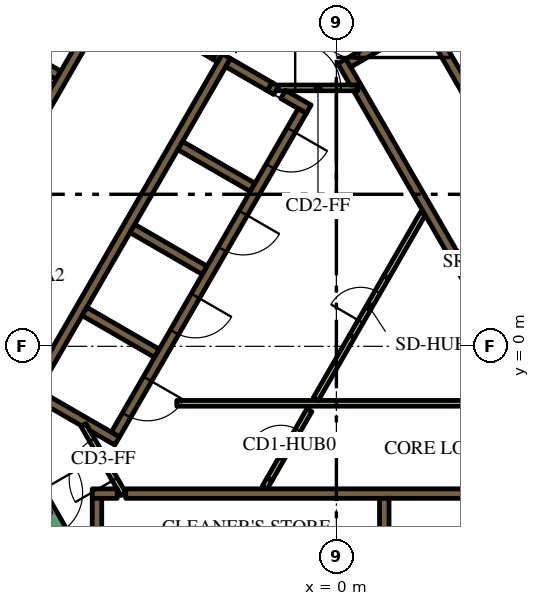
"""IFC4 building model, lengths in metres.
Left out: names, types, materials, properties, quantities, classifications, styles, units other than length and angle.
Written with IfcOpenShell. Run it as: python <this file> out.ifc"""

import sys

from ifc_helpers import new_model, si_unit, direction, frame, frame_2d, origin, place, context, subcontext, project, spatial, polyline, rectangle, outline, extrude, element, fill, save


model = new_model("IFC4")
c1 = context("Model", 3, precision=1e-05, world=origin(), true_north=direction((0.0, 1.0)))
c2 = subcontext(c1, "Body", "Model", "MODEL_VIEW")
j1 = project(units=[si_unit("LENGTHUNIT", "METRE"), si_unit("PLANEANGLEUNIT", "RADIAN")], contexts=[c1])
p1 = place(None, origin())
s1 = spatial("IfcSite", under=j1, at=p1, CompositionType="ELEMENT")
p2 = place(p1, origin())
s2 = spatial("IfcBuilding", under=s1, at=p2, CompositionType="ELEMENT")
p3 = place(p2, frame((0.0, 0.0, 27.6)))
s3 = spatial("IfcBuildingStorey", under=s2, at=p3, CompositionType="ELEMENT", Elevation=27.6)
p4 = place(p3, frame((-15.36, -1.503, 0.0), z_axis=(0.0, 0.0, 1.0), x_axis=(0.50000389221, 0.866023156604, 0.0)))
e1 = element("IfcWall", 1, at=p4, inside=s3, PredefinedType="SOLIDWALL", context=c2, shape_type="SweptSolid", body=[
    extrude(rectangle(XDim=21.0, YDim=0.9, at=frame_2d((10.5, 0.0))), origin(), (0.0, 0.0, 1.0), 3.9),
])
p5 = place(p3, frame((-5.545, -3.875, 0.0), z_axis=(0.0, 0.0, 1.0), x_axis=(1.0, 0.0, 0.0)))
e2 = element("IfcWall", 2, at=p5, inside=s3, PredefinedType="SOLIDWALL", context=c2, shape_type="SweptSolid", body=[
    extrude(rectangle(XDim=11.97, YDim=0.25, at=frame_2d((5.985, 0.0))), origin(), (0.0, 0.0, 1.0), 3.9),
])
p6 = place(p3, frame((-6.425, -3.875, 0.0), z_axis=(0.0, 0.0, 1.0), x_axis=(1.0, 0.0, 0.0)))
e3 = element("IfcWall", 3, at=p6, inside=s3, PredefinedType="SOLIDWALL", context=c2, shape_type="SweptSolid", body=[
    extrude(rectangle(XDim=0.658, YDim=0.25, at=frame_2d((0.329, 0.0))), origin(), (0.0, 0.0, 1.0), 3.9),
])
p7 = place(p3, frame((1.26, -4.0, 0.0), z_axis=(0.0, 0.0, 1.0), x_axis=(0.0, -1.0, 0.0)))
e4 = element("IfcWall", 4, at=p7, inside=s3, PredefinedType="SOLIDWALL", context=c2, shape_type="SweptSolid", body=[
    extrude(rectangle(XDim=2.2, YDim=0.25, at=frame_2d((1.1, 0.0))), origin(), (0.0, 0.0, 1.0), 3.9),
])
p8 = place(p3, frame((-6.3, -4.0, 0.0), z_axis=(0.0, 0.0, 1.0), x_axis=(0.0, -1.0, 0.0)))
e5 = element("IfcWall", 5, at=p8, inside=s3, PredefinedType="SOLIDWALL", context=c2, shape_type="SweptSolid", body=[
    extrude(rectangle(XDim=3.154, YDim=0.25, at=frame_2d((1.577, 0.0))), origin(), (0.0, 0.0, 1.0), 3.9),
])
p9 = place(p3, origin())
e6 = element("IfcWall", 6, at=p9, inside=s3, PredefinedType="SOLIDWALL", context=c2, shape_type="SweptSolid", body=[
    extrude(outline(polyline([(0.566, 6.725), (0.566, 6.875), (0.566, 6.875), (0.565, 6.875), (0.361, 6.875), (0.035, 7.439), (0.252, 7.564), (0.377, 7.348), (6.552, -3.348), (6.677, -3.564), (6.46, -3.689), (0.448, 6.725), (0.565, 6.725), (0.566, 6.725), (0.566, 6.725)])), origin(), (0.0, 0.0, 1.0), 3.9),
])
p10 = place(p3, frame((0.314, 7.456, 0.0), z_axis=(0.0, 0.0, 1.0), x_axis=(0.866013897511, 0.50001992892, 0.0)))
e7 = element("IfcWall", 7, at=p10, inside=s3, PredefinedType="SOLIDWALL", context=c2, shape_type="SweptSolid", body=[
    extrude(rectangle(XDim=3.268, YDim=0.25, at=frame_2d((1.634, 0.0))), origin(), (0.0, 0.0, 1.0), 3.9),
])
p11 = place(p3, frame((-8.06, -1.311, 0.0), z_axis=(0.0, 0.0, 1.0), x_axis=(0.50000273126, 0.866023826885, 0.0)))
e8 = element("IfcWall", 8, at=p11, inside=s3, PredefinedType="SOLIDWALL", context=c2, shape_type="SweptSolid", body=[
    extrude(rectangle(XDim=10.33, YDim=0.25, at=frame_2d((5.165, 0.0))), origin(), (0.0, 0.0, 1.0), 3.9),
])
p12 = place(p3, frame((-1.758, 6.835, 0.0), z_axis=(0.0, 0.0, 1.0), x_axis=(0.865982457891, -0.500074377092, 0.0)))
e9 = element("IfcWall", 9, at=p12, inside=s3, PredefinedType="SOLIDWALL", context=c2, shape_type="SweptSolid", body=[
    extrude(rectangle(XDim=0.2, YDim=0.25, at=frame_2d((0.1, 0.0))), origin(), (0.0, 0.0, 1.0), 3.9),
])
p13 = place(p3, frame((-1.76, 6.836, 0.0), z_axis=(0.0, 0.0, 1.0), x_axis=(-0.865952863304, 0.500125622755, 0.0)))
e10 = element("IfcWall", 10, at=p13, inside=s3, PredefinedType="SOLIDWALL", context=c2, shape_type="SweptSolid", body=[
    extrude(rectangle(XDim=1.258, YDim=0.25, at=frame_2d((0.629, 0.0))), origin(), (0.0, 0.0, 1.0), 3.9),
])
p14 = place(p3, frame((-0.728, 6.24, 0.0), z_axis=(0.0, 0.0, 1.0), x_axis=(-0.865955664968, 0.500120771724, 0.0)))
e11 = element("IfcWall", 11, at=p14, inside=s3, PredefinedType="SOLIDWALL", context=c2, shape_type="SweptSolid", body=[
    extrude(rectangle(XDim=0.778, YDim=0.25, at=frame_2d((0.389, 0.0))), origin(), (0.0, 0.0, 1.0), 3.9),
])
for number, where, z_axis, x_axis in (
    (12, (-2.204, 4.182, 0.0), (0.0, 0.0, 1.0), (-0.866, 0.5, 0.0)),
    (13, (-5.369, 3.1, 0.0), (0.0, 0.0, 1.0), (0.866, -0.5, 0.0)),
    (14, (-4.724, -0.182, 0.0), (0.0, 0.0, 1.0), (-0.866, 0.5, 0.0)),
):
    element("IfcWall", number, at=place(p3, frame(where, z_axis=z_axis, x_axis=x_axis)), inside=s3, PredefinedType="SOLIDWALL", context=c2, shape_type="SweptSolid", body=[
        extrude(rectangle(XDim=2.2, YDim=0.25, at=frame_2d((1.1, 0.0))), origin(), (0.0, 0.0, 1.0), 3.9),
    ])
e15 = element("IfcWall", 15, at=p9, inside=s3, PredefinedType="SOLIDWALL", context=c2, shape_type="SweptSolid", body=[
    extrude(outline(polyline([(-5.922, -2.257), (-5.922, -2.257), (-5.705, -2.382), (-5.83, -2.598), (-6.483, -2.221), (-6.591, -2.033), (-6.591, -2.033), (-6.7, -2.096), (-7.952, -1.373), (-7.827, -1.156), (-5.922, -2.257)])), origin(), (0.0, 0.0, 1.0), 3.9),
])
e16 = element("IfcWall", 16, at=p9, inside=s3, PredefinedType="SOLIDWALL", context=c2, shape_type="SweptSolid", body=[
    extrude(outline(polyline([(-3.128, 7.481), (-3.259, 7.557), (-3.134, 7.773), (-3.003, 7.698), (-3.128, 7.481)])), origin(), (0.0, 0.0, 1.0), 3.9),
])
p15 = place(p3, frame((-7.314, 7.132, 0.0), z_axis=(0.0, 0.0, 1.0), x_axis=(-0.866008176907, 0.50002983664, 0.0)))
e17 = element("IfcWall", 17, at=p15, inside=s3, PredefinedType="SOLIDWALL", context=c2, shape_type="SweptSolid", body=[
    extrude(rectangle(XDim=2.2, YDim=0.25, at=frame_2d((1.1, 0.0))), origin(), (0.0, 0.0, 1.0), 3.9),
])
p16 = place(p3, frame((-1.887, -3.718, 0.0), z_axis=(0.0, 0.0, 1.0), x_axis=(0.500165633897, 0.865929753888, 0.0)))
e18 = element("IfcWall", 18, at=p16, inside=s3, PredefinedType="PARTITIONING", context=c2, shape_type="SweptSolid", body=[
    extrude(rectangle(XDim=0.254, YDim=0.15, at=frame_2d((0.127, 0.0))), origin(), (0.0, 0.0, 1.0), 2.75),
])
p17 = place(p3, frame((-4.2, -1.5, 0.0), z_axis=(0.0, 0.0, 1.0), x_axis=(1.0, 0.0, 0.0)))
e19 = element("IfcWall", 19, at=p17, inside=s3, PredefinedType="PARTITIONING", context=c2, shape_type="SweptSolid", body=[
    extrude(rectangle(XDim=9.359, YDim=0.15, at=frame_2d((4.68, 0.0))), origin(), (0.0, 0.0, 1.0), 2.75),
])
p18 = place(p3, frame((-0.544, -1.393, 0.0), z_axis=(0.0, 0.0, 1.0), x_axis=(0.499928740635, 0.866066541489, 0.0)))
e20 = element("IfcWall", 20, at=p18, inside=s3, PredefinedType="PARTITIONING", context=c2, shape_type="SweptSolid", body=[
    extrude(rectangle(XDim=1.912, YDim=0.15, at=frame_2d((0.956, 0.0))), origin(), (0.0, 0.0, 1.0), 2.75),
])
p19 = place(p3, frame((1.312, 1.822, 0.0), z_axis=(0.0, 0.0, 1.0), x_axis=(0.500003549559, 0.866023354436, 0.0)))
e21 = element("IfcWall", 21, at=p19, inside=s3, PredefinedType="PARTITIONING", context=c2, shape_type="SweptSolid", body=[
    extrude(rectangle(XDim=1.93, YDim=0.15, at=frame_2d((0.965, 0.0))), origin(), (0.0, 0.0, 1.0), 2.75),
])
p20 = place(p3, frame((8.565, -2.185, 0.0), z_axis=(0.0, 0.0, 1.0), x_axis=(-0.499997954832, 0.866026584559, 0.0)))
e22 = element("IfcWall", 22, at=p20, inside=s3, PredefinedType="SOLIDWALL", context=c2, shape_type="SweptSolid", body=[
    extrude(rectangle(XDim=12.35, YDim=0.25, at=frame_2d((6.175, 0.0))), origin(), (0.0, 0.0, 1.0), 3.9),
])
p21 = place(p20, frame((5.725, 0.0, 0.0)))
e23 = element("IfcOpeningElement", 23, at=p21, cuts=e22, PredefinedType="OPENING", context=c2, shape_type="SweptSolid", body=[
    extrude(rectangle(XDim=0.9, YDim=2.1, at=frame_2d((0.45, 1.05))), frame((0.0, 0.135, 0.0), z_axis=(0.0, -1.0, 0.0), x_axis=(1.0, 0.0, 0.0)), (0.0, 0.0, 1.0), 0.27),
])
p22 = place(p3, frame((-6.008, 9.144, 0.0), z_axis=(0.0, 0.0, 1.0), x_axis=(-0.500006956611, -0.866021387346, 0.0)))
e24 = element("IfcWall", 24, at=p22, inside=s3, PredefinedType="SOLIDWALL", context=c2, shape_type="SweptSolid", body=[
    extrude(rectangle(XDim=9.83, YDim=0.25, at=frame_2d((4.915, 0.0))), origin(), (0.0, 0.0, 1.0), 3.9),
])
p23 = place(p22, frame((6.985, 0.0, 0.0)))
e25 = element("IfcOpeningElement", 25, at=p23, cuts=e24, PredefinedType="OPENING", context=c2, shape_type="SweptSolid", body=[
    extrude(rectangle(XDim=0.9, YDim=2.1, at=frame_2d((0.45, 1.05))), frame((0.0, 0.135, 0.0), z_axis=(0.0, -1.0, 0.0), x_axis=(1.0, 0.0, 0.0)), (0.0, 0.0, 1.0), 0.27),
])
p24 = place(p3, frame((-0.898, 6.194, 0.0), z_axis=(0.0, 0.0, 1.0), x_axis=(-0.499996202215, -0.866027596426, 0.0)))
e26 = element("IfcWall", 26, at=p24, inside=s3, PredefinedType="SOLIDWALL", context=c2, shape_type="SweptSolid", body=[
    extrude(rectangle(XDim=9.83, YDim=0.25, at=frame_2d((4.915, 0.0))), origin(), (0.0, 0.0, 1.0), 3.9),
])
p25 = place(p24, frame((0.585, 0.0, 0.0)))
e27 = element("IfcOpeningElement", 27, at=p25, cuts=e26, PredefinedType="OPENING", context=c2, shape_type="SweptSolid", body=[
    extrude(rectangle(XDim=1.1, YDim=2.1, at=frame_2d((0.55, 1.05))), frame((0.0, 0.135, 0.0), z_axis=(0.0, -1.0, 0.0), x_axis=(1.0, 0.0, 0.0)), (0.0, 0.0, 1.0), 0.27),
])
p26 = place(p24, frame((3.105, 0.0, 0.0)))
e28 = element("IfcOpeningElement", 28, at=p26, cuts=e26, PredefinedType="OPENING", context=c2, shape_type="SweptSolid", body=[
    extrude(rectangle(XDim=1.1, YDim=2.1, at=frame_2d((0.55, 1.05))), frame((0.0, 0.135, 0.0), z_axis=(0.0, -1.0, 0.0), x_axis=(1.0, 0.0, 0.0)), (0.0, 0.0, 1.0), 0.27),
])
p27 = place(p24, frame((5.625, 0.0, 0.0)))
e29 = element("IfcOpeningElement", 29, at=p27, cuts=e26, PredefinedType="OPENING", context=c2, shape_type="SweptSolid", body=[
    extrude(rectangle(XDim=1.1, YDim=2.1, at=frame_2d((0.55, 1.05))), frame((0.0, 0.135, 0.0), z_axis=(0.0, -1.0, 0.0), x_axis=(1.0, 0.0, 0.0)), (0.0, 0.0, 1.0), 0.27),
])
p28 = place(p24, frame((8.145, 0.0, 0.0)))
e30 = element("IfcOpeningElement", 30, at=p28, cuts=e26, PredefinedType="OPENING", context=c2, shape_type="SweptSolid", body=[
    extrude(rectangle(XDim=1.1, YDim=2.1, at=frame_2d((0.55, 1.05))), frame((0.0, 0.135, 0.0), z_axis=(0.0, -1.0, 0.0), x_axis=(1.0, 0.0, 0.0)), (0.0, 0.0, 1.0), 0.27),
])
p29 = place(p3, frame((-8.103, -3.466, 0.0), z_axis=(0.0, 0.0, 1.0), x_axis=(0.500078061341, -0.865980330357, 0.0)))
e31 = element("IfcWall", 31, at=p29, inside=s3, PredefinedType="SOLIDWALL", context=c2, shape_type="SweptSolid", body=[
    extrude(rectangle(XDim=2.1, YDim=0.4, at=frame_2d((1.05, 0.0))), origin(), (0.0, 0.0, 1.0), 3.9),
])
p30 = place(p29, frame((0.45, 0.0, 0.0)))
e32 = element("IfcOpeningElement", 32, at=p30, cuts=e31, PredefinedType="OPENING", context=c2, shape_type="SweptSolid", body=[
    extrude(rectangle(XDim=1.2, YDim=2.1, at=frame_2d((0.6, 1.05))), frame((0.0, 0.21, 0.0), z_axis=(0.0, -1.0, 0.0), x_axis=(1.0, 0.0, 0.0)), (0.0, 0.0, 1.0), 0.42),
])
p31 = place(p3, frame((-1.76, -3.498, 0.0), z_axis=(0.0, 0.0, 1.0), x_axis=(0.499977374825, 0.866038466041, 0.0)))
e33 = element("IfcWall", 33, at=p31, inside=s3, PredefinedType="PARTITIONING", context=c2, shape_type="SweptSolid", body=[
    extrude(rectangle(XDim=2.1, YDim=0.15, at=frame_2d((1.05, 0.0))), origin(), (0.0, 0.0, 1.0), 2.75),
])
p32 = place(p31, frame((0.6, 0.0, 0.0)))
e34 = element("IfcOpeningElement", 34, at=p32, cuts=e33, PredefinedType="OPENING", context=c2, shape_type="SweptSolid", body=[
    extrude(rectangle(XDim=0.9, YDim=2.1, at=frame_2d((0.45, 1.05))), frame((0.0, 0.085, 0.0), z_axis=(0.0, -1.0, 0.0), x_axis=(1.0, 0.0, 0.0)), (0.0, 0.0, 1.0), 0.17),
])
p33 = place(p3, frame((-1.534, 6.8, 0.0), z_axis=(0.0, 0.0, 1.0), x_axis=(1.0, 0.0, 0.0)))
e35 = element("IfcWall", 35, at=p33, inside=s3, PredefinedType="PARTITIONING", context=c2, shape_type="SweptSolid", body=[
    extrude(rectangle(XDim=2.1, YDim=0.15, at=frame_2d((1.05, 0.0))), origin(), (0.0, 0.0, 1.0), 2.75),
])
p34 = place(p33, frame((0.45, 0.0, 0.0)))
e36 = element("IfcOpeningElement", 36, at=p34, cuts=e35, PredefinedType="OPENING", context=c2, shape_type="SweptSolid", body=[
    extrude(rectangle(XDim=1.2, YDim=2.1, at=frame_2d((0.6, 1.05))), frame((0.0, 0.085, 0.0), z_axis=(0.0, -1.0, 0.0), x_axis=(1.0, 0.0, 0.0)), (0.0, 0.0, 1.0), 0.17),
])
p35 = place(p3, frame((-5.606, -3.89, 0.0), z_axis=(0.0, 0.0, 1.0), x_axis=(-0.500027713859, 0.866009402589, 0.0)))
e37 = element("IfcWall", 37, at=p35, inside=s3, PredefinedType="PARTITIONING", context=c2, shape_type="SweptSolid", body=[
    extrude(rectangle(XDim=2.1, YDim=0.15, at=frame_2d((1.05, 0.0))), origin(), (0.0, 0.0, 1.0), 2.75),
])
p36 = place(p35, frame((0.45, 0.0, 0.0)))
e38 = element("IfcOpeningElement", 38, at=p36, cuts=e37, PredefinedType="OPENING", context=c2, shape_type="SweptSolid", body=[
    extrude(rectangle(XDim=1.2, YDim=2.1, at=frame_2d((0.6, 1.05))), frame((0.0, 0.085, 0.0), z_axis=(0.0, -1.0, 0.0), x_axis=(1.0, 0.0, 0.0)), (0.0, 0.0, 1.0), 0.17),
])
p37 = place(p3, frame((-4.409, 8.365, 0.0), z_axis=(0.0, 0.0, 1.0), x_axis=(0.866034573852, -0.49998411664, 0.0)))
e39 = element("IfcWall", 39, at=p37, inside=s3, PredefinedType="SOLIDWALL", context=c2, shape_type="SweptSolid", body=[
    extrude(rectangle(XDim=1.4, YDim=0.25, at=frame_2d((0.7, 0.0))), origin(), (0.0, 0.0, 1.0), 3.9),
])
p38 = place(p37, frame((0.1, 0.0, 0.0)))
e40 = element("IfcOpeningElement", 40, at=p38, cuts=e39, PredefinedType="OPENING", context=c2, shape_type="SweptSolid", body=[
    extrude(rectangle(XDim=1.2, YDim=2.1, at=frame_2d((0.6, 1.05))), frame((0.0, 0.135, 0.0), z_axis=(0.0, -1.0, 0.0), x_axis=(1.0, 0.0, 0.0)), (0.0, 0.0, 1.0), 0.27),
])
p39 = place(p3, frame((0.412, 0.263, 0.0), z_axis=(0.0, 0.0, 1.0), x_axis=(0.500062916607, 0.865989075817, 0.0)))
e41 = element("IfcWall", 41, at=p39, inside=s3, PredefinedType="PARTITIONING", context=c2, shape_type="SweptSolid", body=[
    extrude(rectangle(XDim=1.8, YDim=0.15, at=frame_2d((0.9, 0.0))), origin(), (0.0, 0.0, 1.0), 2.75),
])
p40 = place(p39, frame((0.45, 0.0, 0.0)))
e42 = element("IfcOpeningElement", 42, at=p40, cuts=e41, PredefinedType="OPENING", context=c2, shape_type="SweptSolid", body=[
    extrude(rectangle(XDim=0.9, YDim=2.1, at=frame_2d((0.45, 1.05))), frame((0.0, 0.085, 0.0), z_axis=(0.0, -1.0, 0.0), x_axis=(1.0, 0.0, 0.0)), (0.0, 0.0, 1.0), 0.17),
])
p41 = place(p3, frame((-19.081, -3.9, 0.0), z_axis=(0.0, 0.0, 1.0), x_axis=(0.499998313975, 0.866026377209, 0.0)))
e43 = element("IfcWall", 43, at=p41, inside=s3, PredefinedType="PARTITIONING", context=c2, shape_type="SweptSolid", body=[
    extrude(rectangle(XDim=25.766, YDim=0.15, at=frame_2d((12.883, 0.0))), origin(), (0.0, 0.0, 1.0), 2.75),
])
p42 = place(p41, frame((24.586, 0.0, 0.0)))
e44 = element("IfcOpeningElement", 44, at=p42, cuts=e43, PredefinedType="OPENING", context=c2, shape_type="SweptSolid", body=[
    extrude(rectangle(XDim=1.0, YDim=2.1, at=frame_2d((0.5, 1.05))), frame((0.0, 0.085, 0.0), z_axis=(0.0, -1.0, 0.0), x_axis=(1.0, 0.0, 0.0)), (0.0, 0.0, 1.0), 0.17),
])
p43 = place(p41, frame((16.196, 0.0, 0.0)))
e45 = element("IfcOpeningElement", 45, at=p43, cuts=e43, PredefinedType="OPENING", context=c2, shape_type="SweptSolid", body=[
    extrude(rectangle(XDim=1.0, YDim=2.1, at=frame_2d((0.5, 1.05))), frame((0.0, 0.085, 0.0), z_axis=(0.0, -1.0, 0.0), x_axis=(1.0, 0.0, 0.0)), (0.0, 0.0, 1.0), 0.17),
])
p44 = place(p41, frame((14.789, 0.0, 0.0)))
e46 = element("IfcOpeningElement", 46, at=p44, cuts=e43, PredefinedType="OPENING", context=c2, shape_type="SweptSolid", body=[
    extrude(rectangle(XDim=1.1, YDim=2.1, at=frame_2d((0.55, 1.05))), frame((0.0, 0.085, 0.0), z_axis=(0.0, -1.0, 0.0), x_axis=(1.0, 0.0, 0.0)), (0.0, 0.0, 1.0), 0.17),
])
p45 = place(p41, frame((3.698, 0.0, 0.0)))
e47 = element("IfcOpeningElement", 47, at=p45, cuts=e43, PredefinedType="OPENING", context=c2, shape_type="SweptSolid", body=[
    extrude(rectangle(XDim=1.0, YDim=2.1, at=frame_2d((0.5, 1.05))), frame((0.0, 0.085, 0.0), z_axis=(0.0, -1.0, 0.0), x_axis=(1.0, 0.0, 0.0)), (0.0, 0.0, 1.0), 0.17),
])
p46 = place(p41, frame((1.531, 0.0, 0.0)))
e48 = element("IfcOpeningElement", 48, at=p46, cuts=e43, PredefinedType="OPENING", context=c2, shape_type="SweptSolid", body=[
    extrude(rectangle(XDim=0.9, YDim=2.1, at=frame_2d((0.45, 1.05))), frame((0.0, 0.085, 0.0), z_axis=(0.0, -1.0, 0.0), x_axis=(1.0, 0.0, 0.0)), (0.0, 0.0, 1.0), 0.17),
])
p47 = place(p25, origin())
e49 = element("IfcDoor", 49, at=p47, inside=s3, OperationType="DOUBLE_DOOR_SLIDING", PredefinedType="DOOR", context=c2, shape_type="SweptSolid", body=[
    extrude(rectangle(XDim=1.1, YDim=2.1, at=frame_2d((0.55, 1.05))), frame((0.0, 0.025, 0.0), z_axis=(0.0, -1.0, 0.0), x_axis=(1.0, 0.0, 0.0)), (0.0, 0.0, 1.0), 0.05),
])
fill(e27, e49)
p48 = place(p26, origin())
e50 = element("IfcDoor", 50, at=p48, inside=s3, OperationType="DOUBLE_DOOR_SLIDING", PredefinedType="DOOR", context=c2, shape_type="SweptSolid", body=[
    extrude(rectangle(XDim=1.1, YDim=2.1, at=frame_2d((0.55, 1.05))), frame((0.0, 0.025, 0.0), z_axis=(0.0, -1.0, 0.0), x_axis=(1.0, 0.0, 0.0)), (0.0, 0.0, 1.0), 0.05),
])
fill(e28, e50)
p49 = place(p27, origin())
e51 = element("IfcDoor", 51, at=p49, inside=s3, OperationType="DOUBLE_DOOR_SLIDING", PredefinedType="DOOR", context=c2, shape_type="SweptSolid", body=[
    extrude(rectangle(XDim=1.1, YDim=2.1, at=frame_2d((0.55, 1.05))), frame((0.0, 0.025, 0.0), z_axis=(0.0, -1.0, 0.0), x_axis=(1.0, 0.0, 0.0)), (0.0, 0.0, 1.0), 0.05),
])
fill(e29, e51)
p50 = place(p28, origin())
e52 = element("IfcDoor", 52, at=p50, inside=s3, OperationType="DOUBLE_DOOR_SLIDING", PredefinedType="DOOR", context=c2, shape_type="SweptSolid", body=[
    extrude(rectangle(XDim=1.1, YDim=2.1, at=frame_2d((0.55, 1.05))), frame((0.0, 0.025, 0.0), z_axis=(0.0, -1.0, 0.0), x_axis=(1.0, 0.0, 0.0)), (0.0, 0.0, 1.0), 0.05),
])
fill(e30, e52)
p51 = place(p30, origin())
e53 = element("IfcDoor", 53, at=p51, inside=s3, OperationType="SINGLE_SWING_LEFT", PredefinedType="DOOR", context=c2, shape_type="SweptSolid", body=[
    extrude(rectangle(XDim=1.2, YDim=2.1, at=frame_2d((0.6, 1.05))), frame((0.0, 0.025, 0.0), z_axis=(0.0, -1.0, 0.0), x_axis=(1.0, 0.0, 0.0)), (0.0, 0.0, 1.0), 0.05),
])
fill(e32, e53)
p52 = place(p32, origin())
e54 = element("IfcDoor", 54, at=p52, inside=s3, OperationType="SINGLE_SWING_LEFT", PredefinedType="DOOR", context=c2, shape_type="SweptSolid", body=[
    extrude(rectangle(XDim=0.9, YDim=2.1, at=frame_2d((0.45, 1.05))), frame((0.0, 0.025, 0.0), z_axis=(0.0, -1.0, 0.0), x_axis=(1.0, 0.0, 0.0)), (0.0, 0.0, 1.0), 0.05),
])
fill(e34, e54)
p53 = place(p34, origin())
e55 = element("IfcDoor", 55, at=p53, inside=s3, OperationType="SINGLE_SWING_LEFT", PredefinedType="DOOR", context=c2, shape_type="SweptSolid", body=[
    extrude(rectangle(XDim=1.2, YDim=2.1, at=frame_2d((0.6, 1.05))), frame((0.0, 0.025, 0.0), z_axis=(0.0, -1.0, 0.0), x_axis=(1.0, 0.0, 0.0)), (0.0, 0.0, 1.0), 0.05),
])
fill(e36, e55)
p54 = place(p36, origin())
e56 = element("IfcDoor", 56, at=p54, inside=s3, OperationType="SINGLE_SWING_LEFT", PredefinedType="DOOR", context=c2, shape_type="SweptSolid", body=[
    extrude(rectangle(XDim=1.2, YDim=2.1, at=frame_2d((0.6, 1.05))), frame((0.0, 0.025, 0.0), z_axis=(0.0, -1.0, 0.0), x_axis=(1.0, 0.0, 0.0)), (0.0, 0.0, 1.0), 0.05),
])
fill(e38, e56)
p55 = place(p38, origin())
e57 = element("IfcDoor", 57, at=p55, inside=s3, OperationType="SINGLE_SWING_LEFT", PredefinedType="DOOR", context=c2, shape_type="SweptSolid", body=[
    extrude(rectangle(XDim=1.2, YDim=2.1, at=frame_2d((0.6, 1.05))), frame((0.0, 0.025, 0.0), z_axis=(0.0, -1.0, 0.0), x_axis=(1.0, 0.0, 0.0)), (0.0, 0.0, 1.0), 0.05),
])
fill(e40, e57)
p56 = place(p40, origin())
e58 = element("IfcDoor", 58, at=p56, inside=s3, OperationType="SINGLE_SWING_LEFT", PredefinedType="DOOR", context=c2, shape_type="SweptSolid", body=[
    extrude(rectangle(XDim=0.9, YDim=2.1, at=frame_2d((0.45, 1.05))), frame((0.0, 0.025, 0.0), z_axis=(0.0, -1.0, 0.0), x_axis=(1.0, 0.0, 0.0)), (0.0, 0.0, 1.0), 0.05),
])
fill(e42, e58)
save(model, sys.argv[1])
